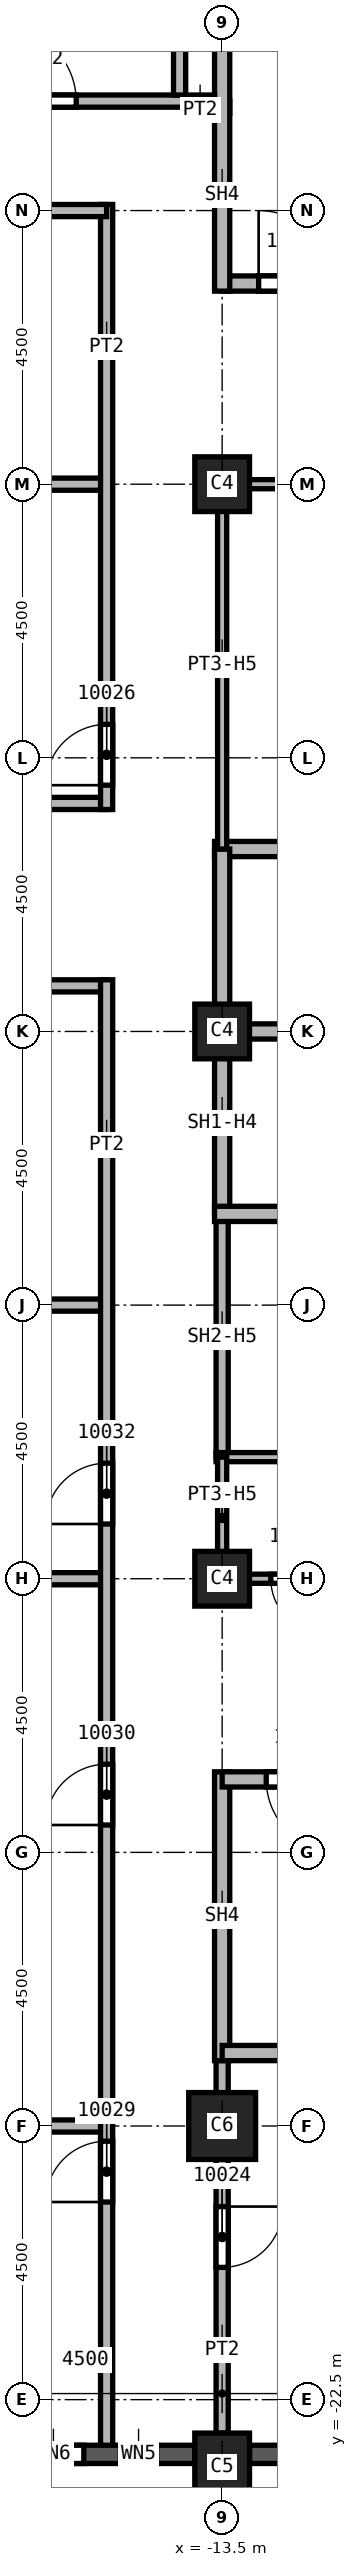
"""IFC4 building model, lengths in metres.
Left out: names, types, materials, properties, quantities, classifications, styles, units other than length and angle.
Written with IfcOpenShell. Run it as: python <this file> out.ifc"""

import sys

from ifc_helpers import new_model, si_unit, direction, frame, frame_2d, origin, origin_2d, place, context, subcontext, project, spatial, rectangle, extrude, element, fill, save


model = new_model("IFC4")
c1 = context("Model", 3, precision=1e-05, world=origin(), true_north=direction((0.0, 1.0)))
c2 = subcontext(c1, "Body", "Model", "MODEL_VIEW")
j1 = project(units=[si_unit("LENGTHUNIT", "METRE"), si_unit("PLANEANGLEUNIT", "RADIAN")], contexts=[c1])
p1 = place(None, origin())
s1 = spatial("IfcSite", under=j1, at=p1, CompositionType="ELEMENT")
p2 = place(p1, origin())
s2 = spatial("IfcBuilding", under=s1, at=p2, CompositionType="ELEMENT")
p3 = place(p2, frame((0.0, 0.0, 174.0)))
s3 = spatial("IfcBuildingStorey", under=s2, at=p3, CompositionType="ELEMENT", Elevation=174.0)
p4 = place(p3, frame((-13.5, -18.0, 0.0), z_axis=(0.0, 0.0, 1.0), x_axis=(1.0, 0.0, 0.0)))
e1 = element("IfcColumn", 1, at=p4, inside=s3, PredefinedType="COLUMN", context=c2, shape_type="SweptSolid", body=[
    extrude(rectangle(XDim=1.1, YDim=1.1, at=origin_2d()), origin(), (0.0, 0.0, 1.0), 3.59),
])
for number, where, z_axis, x_axis in (
    (2, (-13.5, 0.0, 0.0), (0.0, 0.0, 1.0), (1.0, 0.0, 0.0)),
    (3, (-13.5, 9.0, 0.0), (0.0, 0.0, 1.0), (1.0, 0.0, 0.0)),
    (4, (-13.5, -9.0, 0.0), (0.0, 0.0, 1.0), (1.0, 0.0, 0.0)),
):
    element("IfcColumn", number, at=place(p3, frame(where, z_axis=z_axis, x_axis=x_axis)), inside=s3, PredefinedType="COLUMN", context=c2, shape_type="SweptSolid", body=[
        extrude(rectangle(XDim=0.9, YDim=0.9, at=origin_2d()), origin(), (0.0, 0.0, 1.0), 3.59),
    ])
p5 = place(p3, frame((-13.5, -23.6, 0.0), z_axis=(0.0, 0.0, 1.0), x_axis=(1.0, 0.0, 0.0)))
e5 = element("IfcColumn", 5, at=p5, inside=s3, PredefinedType="COLUMN", context=c2, shape_type="SweptSolid", body=[
    extrude(rectangle(XDim=0.9, YDim=1.1, at=origin_2d()), origin(), (0.0, 0.0, 1.0), 3.59),
])
p6 = place(p3, frame((-17.55, -23.4, 0.0), z_axis=(0.0, 0.0, 1.0), x_axis=(1.0, 0.0, 0.0)))
e6 = element("IfcWall", 6, at=p6, inside=s3, PredefinedType="SOLIDWALL", context=c2, shape_type="SweptSolid", body=[
    extrude(rectangle(XDim=3.6, YDim=0.3, at=frame_2d((1.8, 0.0))), origin(), (0.0, 0.0, 1.0), 2.99),
])
p7 = place(p6, frame((0.775, 0.0, 0.8)))
e7 = element("IfcOpeningElement", 7, at=p7, cuts=e6, PredefinedType="OPENING", context=c2, shape_type="SweptSolid", body=[
    extrude(rectangle(XDim=1.0, YDim=1.95, at=frame_2d((0.5, 0.975))), frame((0.0, 0.15, 0.0), z_axis=(0.0, -1.0, 0.0), x_axis=(1.0, 0.0, 0.0)), (0.0, 0.0, 1.0), 0.3),
])
p8 = place(p6, frame((2.375, 0.0, 0.8)))
e8 = element("IfcOpeningElement", 8, at=p8, cuts=e6, PredefinedType="OPENING", context=c2, shape_type="SweptSolid", body=[
    extrude(rectangle(XDim=0.6, YDim=1.95, at=frame_2d((0.3, 0.975))), frame((0.0, 0.15, 0.0), z_axis=(0.0, -1.0, 0.0), x_axis=(1.0, 0.0, 0.0)), (0.0, 0.0, 1.0), 0.3),
])
p9 = place(p3, frame((-13.05, -23.4, 0.0), z_axis=(0.0, 0.0, 1.0), x_axis=(1.0, 0.0, 0.0)))
e9 = element("IfcWall", 9, at=p9, inside=s3, PredefinedType="SOLIDWALL", context=c2, shape_type="SweptSolid", body=[
    extrude(rectangle(XDim=3.6, YDim=0.3, at=frame_2d((1.8, 0.0))), origin(), (0.0, 0.0, 1.0), 2.99),
])
p10 = place(p9, frame((0.6, 0.0, 0.8)))
e10 = element("IfcOpeningElement", 10, at=p10, cuts=e9, PredefinedType="OPENING", context=c2, shape_type="SweptSolid", body=[
    extrude(rectangle(XDim=2.4, YDim=1.95, at=frame_2d((1.2, 0.975))), frame((0.0, 0.15, 0.0), z_axis=(0.0, -1.0, 0.0), x_axis=(1.0, 0.0, 0.0)), (0.0, 0.0, 1.0), 0.3),
])
p11 = place(p3, frame((-33.85, 3.75, 0.0), z_axis=(0.0, 0.0, 1.0), x_axis=(1.0, 0.0, 0.0)))
e11 = element("IfcWall", 11, at=p11, inside=s3, PredefinedType="PARTITIONING", context=c2, shape_type="SweptSolid", body=[
    extrude(rectangle(XDim=18.45, YDim=0.2, at=frame_2d((9.225, 0.0))), origin(), (0.0, 0.0, 1.0), 3.59),
])
p12 = place(p3, frame((-15.4, 0.75, 0.0), z_axis=(0.0, 0.0, 1.0), x_axis=(-1.0, 0.0, 0.0)))
e12 = element("IfcWall", 12, at=p12, inside=s3, PredefinedType="PARTITIONING", context=c2, shape_type="SweptSolid", body=[
    extrude(rectangle(XDim=18.45, YDim=0.2, at=frame_2d((9.225, 0.0))), origin(), (0.0, 0.0, 1.0), 3.59),
])
p13 = place(p12, frame((3.55, 0.0, 0.0)))
e13 = element("IfcOpeningElement", 13, at=p13, cuts=e12, PredefinedType="OPENING", context=c2, shape_type="SweptSolid", body=[
    extrude(rectangle(XDim=1.0, YDim=2.1, at=frame_2d((0.5, 1.05))), frame((0.0, 0.1, 0.0), z_axis=(0.0, -1.0, 0.0), x_axis=(1.0, 0.0, 0.0)), (0.0, 0.0, 1.0), 0.2),
])
p14 = place(p12, frame((12.65, 0.0, 0.0)))
e14 = element("IfcOpeningElement", 14, at=p14, cuts=e12, PredefinedType="OPENING", context=c2, shape_type="SweptSolid", body=[
    extrude(rectangle(XDim=1.0, YDim=2.1, at=frame_2d((0.5, 1.05))), frame((0.0, 0.1, 0.0), z_axis=(0.0, -1.0, 0.0), x_axis=(1.0, 0.0, 0.0)), (0.0, 0.0, 1.0), 0.2),
])
for number, where, z_axis, x_axis in (
    (15, (-27.1, -9.0, 0.0), (0.0, 0.0, 1.0), (1.0, 0.0, 0.0)),
    (16, (-27.1, -4.5, 0.0), (0.0, 0.0, 1.0), (1.0, 0.0, 0.0)),
    (17, (-27.1, 9.0, 0.0), (0.0, 0.0, 1.0), (1.0, 0.0, 0.0)),
):
    element("IfcWall", number, at=place(p3, frame(where, z_axis=z_axis, x_axis=x_axis)), inside=s3, PredefinedType="PARTITIONING", context=c2, shape_type="SweptSolid", body=[
        extrude(rectangle(XDim=11.7, YDim=0.2, at=frame_2d((5.85, 0.0))), origin(), (0.0, 0.0, 1.0), 3.59),
    ])
p15 = place(p3, frame((-24.2, -18.0, 0.0), z_axis=(0.0, 0.0, 1.0), x_axis=(1.0, 0.0, 0.0)))
e18 = element("IfcWall", 18, at=p15, inside=s3, PredefinedType="PARTITIONING", context=c2, shape_type="SweptSolid", body=[
    extrude(rectangle(XDim=8.8, YDim=0.2, at=frame_2d((4.4, 0.0))), origin(), (0.0, 0.0, 1.0), 3.59),
])
p16 = place(p3, frame((-15.4, -23.25, 0.0), z_axis=(0.0, 0.0, 1.0), x_axis=(0.0, 1.0, 0.0)))
e19 = element("IfcWall", 19, at=p16, inside=s3, PredefinedType="PARTITIONING", context=c2, shape_type="SweptSolid", body=[
    extrude(rectangle(XDim=24.1, YDim=0.2, at=frame_2d((12.05, 0.0))), origin(), (0.0, 0.0, 1.0), 3.59),
])
p17 = place(p16, frame((4.0, 0.0, 0.0)))
e20 = element("IfcOpeningElement", 20, at=p17, cuts=e19, PredefinedType="OPENING", context=c2, shape_type="SweptSolid", body=[
    extrude(rectangle(XDim=1.0, YDim=2.1, at=frame_2d((0.5, 1.05))), frame((0.0, 0.1, 0.0), z_axis=(0.0, -1.0, 0.0), x_axis=(1.0, 0.0, 0.0)), (0.0, 0.0, 1.0), 0.2),
])
p18 = place(p16, frame((10.2, 0.0, 0.0)))
e21 = element("IfcOpeningElement", 21, at=p18, cuts=e19, PredefinedType="OPENING", context=c2, shape_type="SweptSolid", body=[
    extrude(rectangle(XDim=1.0, YDim=2.1, at=frame_2d((0.5, 1.05))), frame((0.0, 0.1, 0.0), z_axis=(0.0, -1.0, 0.0), x_axis=(1.0, 0.0, 0.0)), (0.0, 0.0, 1.0), 0.2),
])
p19 = place(p16, frame((15.15, 0.0, 0.0)))
e22 = element("IfcOpeningElement", 22, at=p19, cuts=e19, PredefinedType="OPENING", context=c2, shape_type="SweptSolid", body=[
    extrude(rectangle(XDim=1.0, YDim=2.1, at=frame_2d((0.5, 1.05))), frame((0.0, 0.1, 0.0), z_axis=(0.0, -1.0, 0.0), x_axis=(1.0, 0.0, 0.0)), (0.0, 0.0, 1.0), 0.2),
])
p20 = place(p3, frame((-15.4, 3.65, 0.0), z_axis=(0.0, 0.0, 1.0), x_axis=(0.0, 1.0, 0.0)))
e23 = element("IfcWall", 23, at=p20, inside=s3, PredefinedType="PARTITIONING", context=c2, shape_type="SweptSolid", body=[
    extrude(rectangle(XDim=9.95, YDim=0.2, at=frame_2d((4.975, 0.0))), origin(), (0.0, 0.0, 1.0), 3.59),
])
p21 = place(p20, frame((0.4, 0.0, 0.0)))
e24 = element("IfcOpeningElement", 24, at=p21, cuts=e23, PredefinedType="OPENING", context=c2, shape_type="SweptSolid", body=[
    extrude(rectangle(XDim=1.0, YDim=2.1, at=frame_2d((0.5, 1.05))), frame((0.0, 0.1, 0.0), z_axis=(0.0, -1.0, 0.0), x_axis=(1.0, 0.0, 0.0)), (0.0, 0.0, 1.0), 0.2),
])
p22 = place(p3, frame((-15.4, 13.5, 0.0), z_axis=(0.0, 0.0, 1.0), x_axis=(-1.0, 0.0, 0.0)))
e25 = element("IfcWall", 25, at=p22, inside=s3, PredefinedType="PARTITIONING", context=c2, shape_type="SweptSolid", body=[
    extrude(rectangle(XDim=6.6, YDim=0.2, at=frame_2d((3.3, 0.0))), origin(), (0.0, 0.0, 1.0), 3.59),
])
p23 = place(p22, frame((5.35, 0.0, 0.0)))
e26 = element("IfcOpeningElement", 26, at=p23, cuts=e25, PredefinedType="OPENING", context=c2, shape_type="SweptSolid", body=[
    extrude(rectangle(XDim=1.0, YDim=2.1, at=frame_2d((0.5, 1.05))), frame((0.0, 0.1, 0.0), z_axis=(0.0, -1.0, 0.0), x_axis=(1.0, 0.0, 0.0)), (0.0, 0.0, 1.0), 0.2),
])
p24 = place(p3, frame((-14.1, 15.2, 0.0), z_axis=(0.0, 0.0, 1.0), x_axis=(1.0, 0.0, 0.0)))
e27 = element("IfcWall", 27, at=p24, inside=s3, PredefinedType="PARTITIONING", context=c2, shape_type="SweptSolid", body=[
    extrude(rectangle(XDim=0.725, YDim=0.2, at=frame_2d((0.363, 0.0))), origin(), (0.0, 0.0, 1.0), 3.59),
])
p25 = place(p3, frame((-13.5, -16.675, 0.0), z_axis=(0.0, 0.0, 1.0), x_axis=(0.0, -1.0, 0.0)))
e28 = element("IfcWall", 28, at=p25, inside=s3, PredefinedType="PARTITIONING", context=c2, shape_type="SweptSolid", body=[
    extrude(rectangle(XDim=6.375, YDim=0.2, at=frame_2d((3.188, 0.0))), origin(), (0.0, 0.0, 1.0), 3.59),
])
p26 = place(p25, frame((2.65, 0.0, 0.0)))
e29 = element("IfcOpeningElement", 29, at=p26, cuts=e28, PredefinedType="OPENING", context=c2, shape_type="SweptSolid", body=[
    extrude(rectangle(XDim=1.0, YDim=2.1, at=frame_2d((0.5, 1.05))), frame((0.0, 0.1, 0.0), z_axis=(0.0, -1.0, 0.0), x_axis=(1.0, 0.0, 0.0)), (0.0, 0.0, 1.0), 0.2),
])
p27 = place(p3, frame((-13.5, -7.0, 0.0), z_axis=(0.0, 0.0, 1.0), x_axis=(0.0, 1.0, 0.0)))
e30 = element("IfcWall", 30, at=p27, inside=s3, PredefinedType="SOLIDWALL", context=c2, shape_type="SweptSolid", body=[
    extrude(rectangle(XDim=4.0, YDim=0.2, at=frame_2d((2.0, 0.0))), origin(), (0.0, 0.0, 1.0), 2.828),
])
p28 = place(p3, frame((-13.625, 0.0, 0.0), z_axis=(0.0, 0.0, 1.0), x_axis=(1.0, 0.0, 0.0)))
e31 = element("IfcWall", 31, at=p28, inside=s3, PredefinedType="SOLIDWALL", context=c2, shape_type="SweptSolid", body=[
    extrude(rectangle(XDim=3.125, YDim=0.25, at=frame_2d((1.562, 0.0))), origin(), (0.0, 0.0, 1.0), 3.59),
])
p29 = place(p3, frame((-13.625, 3.0, 0.0), z_axis=(0.0, 0.0, 1.0), x_axis=(1.0, 0.0, 0.0)))
e32 = element("IfcWall", 32, at=p29, inside=s3, PredefinedType="SOLIDWALL", context=c2, shape_type="SweptSolid", body=[
    extrude(rectangle(XDim=6.125, YDim=0.25, at=frame_2d((3.062, 0.0))), origin(), (0.0, 0.0, 1.0), 3.59),
])
p30 = place(p29, frame((3.25, 0.0, 0.0)))
e33 = element("IfcOpeningElement", 33, at=p30, cuts=e32, PredefinedType="OPENING", context=c2, shape_type="SweptSolid", body=[
    extrude(rectangle(XDim=1.1, YDim=2.1, at=frame_2d((0.55, 1.05))), frame((0.0, 0.125, 0.0), z_axis=(0.0, -1.0, 0.0), x_axis=(1.0, 0.0, 0.0)), (0.0, 0.0, 1.0), 0.25),
])
p31 = place(p3, frame((-13.5, -3.0, 0.0), z_axis=(0.0, 0.0, 1.0), x_axis=(0.0, 1.0, 0.0)))
e34 = element("IfcWall", 34, at=p31, inside=s3, PredefinedType="SOLIDWALL", context=c2, shape_type="SweptSolid", body=[
    extrude(rectangle(XDim=6.0, YDim=0.25, at=frame_2d((3.0, 0.0))), origin(), (0.0, 0.0, 1.0), 2.828),
])
p32 = place(p3, frame((-13.625, -3.0, 0.0), z_axis=(0.0, 0.0, 1.0), x_axis=(1.0, 0.0, 0.0)))
e35 = element("IfcWall", 35, at=p32, inside=s3, PredefinedType="SOLIDWALL", context=c2, shape_type="SweptSolid", body=[
    extrude(rectangle(XDim=9.25, YDim=0.25, at=frame_2d((4.625, 0.0))), origin(), (0.0, 0.0, 1.0), 3.59),
])
p33 = place(p32, frame((3.25, 0.0, 0.0)))
e36 = element("IfcOpeningElement", 36, at=p33, cuts=e35, PredefinedType="OPENING", context=c2, shape_type="SweptSolid", body=[
    extrude(rectangle(XDim=1.1, YDim=2.1, at=frame_2d((0.55, 1.05))), frame((0.0, 0.125, 0.0), z_axis=(0.0, -1.0, 0.0), x_axis=(1.0, 0.0, 0.0)), (0.0, 0.0, 1.0), 0.25),
])
p34 = place(p3, frame((-13.5, -12.175, 0.0), z_axis=(0.0, 0.0, 1.0), x_axis=(0.0, -1.0, 0.0)))
e37 = element("IfcWall", 37, at=p34, inside=s3, PredefinedType="SOLIDWALL", context=c2, shape_type="SweptSolid", body=[
    extrude(rectangle(XDim=4.75, YDim=0.25, at=frame_2d((2.375, 0.0))), origin(), (0.0, 0.0, 1.0), 3.59),
])
p35 = place(p3, frame((-13.5, 12.3, 0.0), z_axis=(0.0, 0.0, 1.0), x_axis=(1.0, 0.0, 0.0)))
e38 = element("IfcWall", 38, at=p35, inside=s3, PredefinedType="SOLIDWALL", context=c2, shape_type="SweptSolid", body=[
    extrude(rectangle(XDim=9.125, YDim=0.25, at=frame_2d((4.562, 0.0))), origin(), (0.0, 0.0, 1.0), 3.59),
])
p36 = place(p35, frame((0.6, 0.0, 0.0)))
e39 = element("IfcOpeningElement", 39, at=p36, cuts=e38, PredefinedType="OPENING", context=c2, shape_type="SweptSolid", body=[
    extrude(rectangle(XDim=1.2, YDim=2.1, at=frame_2d((0.6, 1.05))), frame((0.0, 0.125, 0.0), z_axis=(0.0, -1.0, 0.0), x_axis=(1.0, 0.0, 0.0)), (0.0, 0.0, 1.0), 0.25),
])
p37 = place(p3, frame((-13.5, 12.175, 0.0), z_axis=(0.0, 0.0, 1.0), x_axis=(0.0, 1.0, 0.0)))
e40 = element("IfcWall", 40, at=p37, inside=s3, PredefinedType="SOLIDWALL", context=c2, shape_type="SweptSolid", body=[
    extrude(rectangle(XDim=4.75, YDim=0.25, at=frame_2d((2.375, 0.0))), origin(), (0.0, 0.0, 1.0), 3.59),
])
p38 = place(p3, frame((-4.5, -16.8, 0.0), z_axis=(0.0, 0.0, 1.0), x_axis=(-1.0, 0.0, 0.0)))
e41 = element("IfcWall", 41, at=p38, inside=s3, PredefinedType="SOLIDWALL", context=c2, shape_type="SweptSolid", body=[
    extrude(rectangle(XDim=9.0, YDim=0.25, at=frame_2d((4.5, 0.0))), origin(), (0.0, 0.0, 1.0), 3.59),
])
p39 = place(p3, frame((-4.375, -12.3, 0.0), z_axis=(0.0, 0.0, 1.0), x_axis=(-1.0, 0.0, 0.0)))
e42 = element("IfcWall", 42, at=p39, inside=s3, PredefinedType="SOLIDWALL", context=c2, shape_type="SweptSolid", body=[
    extrude(rectangle(XDim=9.125, YDim=0.25, at=frame_2d((4.562, 0.0))), origin(), (0.0, 0.0, 1.0), 3.59),
])
p40 = place(p39, frame((7.2, 0.0, 0.0)))
e43 = element("IfcOpeningElement", 43, at=p40, cuts=e42, PredefinedType="OPENING", context=c2, shape_type="SweptSolid", body=[
    extrude(rectangle(XDim=1.2, YDim=2.1, at=frame_2d((0.6, 1.05))), frame((0.0, 0.125, 0.0), z_axis=(0.0, -1.0, 0.0), x_axis=(1.0, 0.0, 0.0)), (0.0, 0.0, 1.0), 0.25),
])
p41 = place(p3, frame((-13.6, -7.0, 0.0), z_axis=(0.0, 0.0, 1.0), x_axis=(1.0, 0.0, 0.0)))
e44 = element("IfcWall", 44, at=p41, inside=s3, PredefinedType="PARTITIONING", context=c2, shape_type="SweptSolid", body=[
    extrude(rectangle(XDim=3.1, YDim=0.15, at=frame_2d((1.55, 0.0))), origin(), (0.0, 0.0, 1.0), 3.59),
])
p42 = place(p3, frame((-13.5, -9.075, 0.0), z_axis=(0.0, 0.0, 1.0), x_axis=(0.0, 1.0, 0.0)))
e45 = element("IfcWall", 45, at=p42, inside=s3, PredefinedType="PARTITIONING", context=c2, shape_type="SweptSolid", body=[
    extrude(rectangle(XDim=2.075, YDim=0.15, at=frame_2d((1.038, 0.0))), origin(), (0.0, 0.0, 1.0), 2.828),
])
p43 = place(p3, frame((-13.5, 3.0, 0.0), z_axis=(0.0, 0.0, 1.0), x_axis=(0.0, 1.0, 0.0)))
e46 = element("IfcWall", 46, at=p43, inside=s3, PredefinedType="PARTITIONING", context=c2, shape_type="SweptSolid", body=[
    extrude(rectangle(XDim=6.075, YDim=0.15, at=frame_2d((3.038, 0.0))), origin(), (0.0, 0.0, 1.0), 2.828),
])
p44 = place(p3, frame((-13.5, 9.0, 0.0), z_axis=(0.0, 0.0, 1.0), x_axis=(1.0, 0.0, 0.0)))
e47 = element("IfcWall", 47, at=p44, inside=s3, PredefinedType="PARTITIONING", context=c2, shape_type="SweptSolid", body=[
    extrude(rectangle(XDim=3.0, YDim=0.15, at=frame_2d((1.5, 0.0))), origin(), (0.0, 0.0, 1.0), 2.828),
])
p45 = place(p3, frame((-10.5, -9.0, 0.0), z_axis=(0.0, 0.0, 1.0), x_axis=(-1.0, 0.0, 0.0)))
e48 = element("IfcWall", 48, at=p45, inside=s3, PredefinedType="PARTITIONING", context=c2, shape_type="SweptSolid", body=[
    extrude(rectangle(XDim=3.0, YDim=0.15, at=frame_2d((1.5, 0.0))), origin(), (0.0, 0.0, 1.0), 2.828),
])
p46 = place(p45, frame((1.3, 0.0, 0.0)))
e49 = element("IfcOpeningElement", 49, at=p46, cuts=e48, PredefinedType="OPENING", context=c2, shape_type="SweptSolid", body=[
    extrude(rectangle(XDim=0.9, YDim=2.1, at=frame_2d((0.45, 1.05))), frame((0.0, 0.075, 0.0), z_axis=(0.0, -1.0, 0.0), x_axis=(1.0, 0.0, 0.0)), (0.0, 0.0, 1.0), 0.15),
])
p47 = place(p3, frame((-21.9, 15.3, 0.0), z_axis=(0.0, 0.0, 1.0), x_axis=(1.0, 0.0, 0.0)))
e50 = element("IfcWall", 50, at=p47, inside=s3, PredefinedType="SOLIDWALL", context=c2, shape_type="SweptSolid", body=[
    extrude(rectangle(XDim=8.275, YDim=0.2, at=frame_2d((4.137, 0.0))), origin(), (0.0, 0.0, 1.0), 3.59),
])
p48 = place(p47, frame((4.8, 0.0, 0.0)))
e51 = element("IfcOpeningElement", 51, at=p48, cuts=e50, PredefinedType="OPENING", context=c2, shape_type="SweptSolid", body=[
    extrude(rectangle(XDim=1.2, YDim=2.1, at=frame_2d((0.6, 1.05))), frame((0.0, 0.1, 0.0), z_axis=(0.0, -1.0, 0.0), x_axis=(1.0, 0.0, 0.0)), (0.0, 0.0, 1.0), 0.2),
])
p49 = place(p3, frame((-14.2, 15.4, 0.0), z_axis=(0.0, 0.0, 1.0), x_axis=(0.0, 1.0, 0.0)))
e52 = element("IfcWall", 52, at=p49, inside=s3, PredefinedType="SOLIDWALL", context=c2, shape_type="SweptSolid", body=[
    extrude(rectangle(XDim=5.9, YDim=0.2, at=frame_2d((2.95, 0.0))), origin(), (0.0, 0.0, 1.0), 3.59),
])
p50 = place(p46, origin())
e53 = element("IfcDoor", 53, at=p50, inside=s3, OperationType="SINGLE_SWING_RIGHT", PredefinedType="DOOR", context=c2, shape_type="SweptSolid", body=[
    extrude(rectangle(XDim=0.9, YDim=2.1, at=frame_2d((0.45, 1.05))), frame((0.0, 0.025, 0.0), z_axis=(0.0, -1.0, 0.0), x_axis=(1.0, 0.0, 0.0)), (0.0, 0.0, 1.0), 0.05),
])
fill(e49, e53)
p51 = place(p36, origin())
e54 = element("IfcDoor", 54, at=p51, inside=s3, OperationType="SINGLE_SWING_LEFT", PredefinedType="DOOR", context=c2, shape_type="SweptSolid", body=[
    extrude(rectangle(XDim=1.2, YDim=2.1, at=frame_2d((0.6, 1.05))), frame((0.0, 0.025, 0.0), z_axis=(0.0, -1.0, 0.0), x_axis=(1.0, 0.0, 0.0)), (0.0, 0.0, 1.0), 0.05),
])
fill(e39, e54)
p52 = place(p40, origin())
e55 = element("IfcDoor", 55, at=p52, inside=s3, OperationType="SINGLE_SWING_RIGHT", PredefinedType="DOOR", context=c2, shape_type="SweptSolid", body=[
    extrude(rectangle(XDim=1.2, YDim=2.1, at=frame_2d((0.6, 1.05))), frame((0.0, 0.025, 0.0), z_axis=(0.0, -1.0, 0.0), x_axis=(1.0, 0.0, 0.0)), (0.0, 0.0, 1.0), 0.05),
])
fill(e43, e55)
p53 = place(p26, origin())
e56 = element("IfcDoor", 56, at=p53, inside=s3, OperationType="SINGLE_SWING_LEFT", PredefinedType="DOOR", context=c2, shape_type="SweptSolid", body=[
    extrude(rectangle(XDim=1.0, YDim=2.1, at=frame_2d((0.5, 1.05))), frame((0.0, 0.025, 0.0), z_axis=(0.0, -1.0, 0.0), x_axis=(1.0, 0.0, 0.0)), (0.0, 0.0, 1.0), 0.05),
])
fill(e29, e56)
p54 = place(p21, origin())
e57 = element("IfcDoor", 57, at=p54, inside=s3, OperationType="SINGLE_SWING_LEFT", PredefinedType="DOOR", context=c2, shape_type="SweptSolid", body=[
    extrude(rectangle(XDim=1.0, YDim=2.1, at=frame_2d((0.5, 1.05))), frame((0.0, 0.025, 0.0), z_axis=(0.0, -1.0, 0.0), x_axis=(1.0, 0.0, 0.0)), (0.0, 0.0, 1.0), 0.05),
])
fill(e24, e57)
p55 = place(p17, origin())
e58 = element("IfcDoor", 58, at=p55, inside=s3, OperationType="SINGLE_SWING_RIGHT", PredefinedType="DOOR", context=c2, shape_type="SweptSolid", body=[
    extrude(rectangle(XDim=1.0, YDim=2.1, at=frame_2d((0.5, 1.05))), frame((0.0, 0.025, 0.0), z_axis=(0.0, -1.0, 0.0), x_axis=(1.0, 0.0, 0.0)), (0.0, 0.0, 1.0), 0.05),
])
fill(e20, e58)
p56 = place(p18, origin())
e59 = element("IfcDoor", 59, at=p56, inside=s3, OperationType="SINGLE_SWING_LEFT", PredefinedType="DOOR", context=c2, shape_type="SweptSolid", body=[
    extrude(rectangle(XDim=1.0, YDim=2.1, at=frame_2d((0.5, 1.05))), frame((0.0, 0.025, 0.0), z_axis=(0.0, -1.0, 0.0), x_axis=(1.0, 0.0, 0.0)), (0.0, 0.0, 1.0), 0.05),
])
fill(e21, e59)
p57 = place(p19, origin())
e60 = element("IfcDoor", 60, at=p57, inside=s3, OperationType="SINGLE_SWING_LEFT", PredefinedType="DOOR", context=c2, shape_type="SweptSolid", body=[
    extrude(rectangle(XDim=1.0, YDim=2.1, at=frame_2d((0.5, 1.05))), frame((0.0, 0.025, 0.0), z_axis=(0.0, -1.0, 0.0), x_axis=(1.0, 0.0, 0.0)), (0.0, 0.0, 1.0), 0.05),
])
fill(e22, e60)
p58 = place(p48, origin())
e61 = element("IfcDoor", 61, at=p58, inside=s3, OperationType="SINGLE_SWING_RIGHT", PredefinedType="DOOR", context=c2, shape_type="SweptSolid", body=[
    extrude(rectangle(XDim=1.2, YDim=2.1, at=frame_2d((0.6, 1.05))), frame((0.0, 0.025, 0.0), z_axis=(0.0, -1.0, 0.0), x_axis=(1.0, 0.0, 0.0)), (0.0, 0.0, 1.0), 0.05),
])
fill(e51, e61)
p59 = place(p7, origin())
e62 = element("IfcWindow", 62, at=p59, inside=s3, PartitioningType="SINGLE_PANEL", PredefinedType="WINDOW", context=c2, shape_type="SweptSolid", body=[
    extrude(rectangle(XDim=1.0, YDim=1.95, at=frame_2d((0.5, 0.975))), frame((0.0, 0.03, 0.0), z_axis=(0.0, -1.0, 0.0), x_axis=(1.0, 0.0, 0.0)), (0.0, 0.0, 1.0), 0.06),
])
fill(e7, e62)
p60 = place(p8, origin())
e63 = element("IfcWindow", 63, at=p60, inside=s3, PartitioningType="SINGLE_PANEL", PredefinedType="WINDOW", context=c2, shape_type="SweptSolid", body=[
    extrude(rectangle(XDim=0.6, YDim=1.95, at=frame_2d((0.3, 0.975))), frame((0.0, 0.03, 0.0), z_axis=(0.0, -1.0, 0.0), x_axis=(1.0, 0.0, 0.0)), (0.0, 0.0, 1.0), 0.06),
])
fill(e8, e63)
save(model, sys.argv[1])
